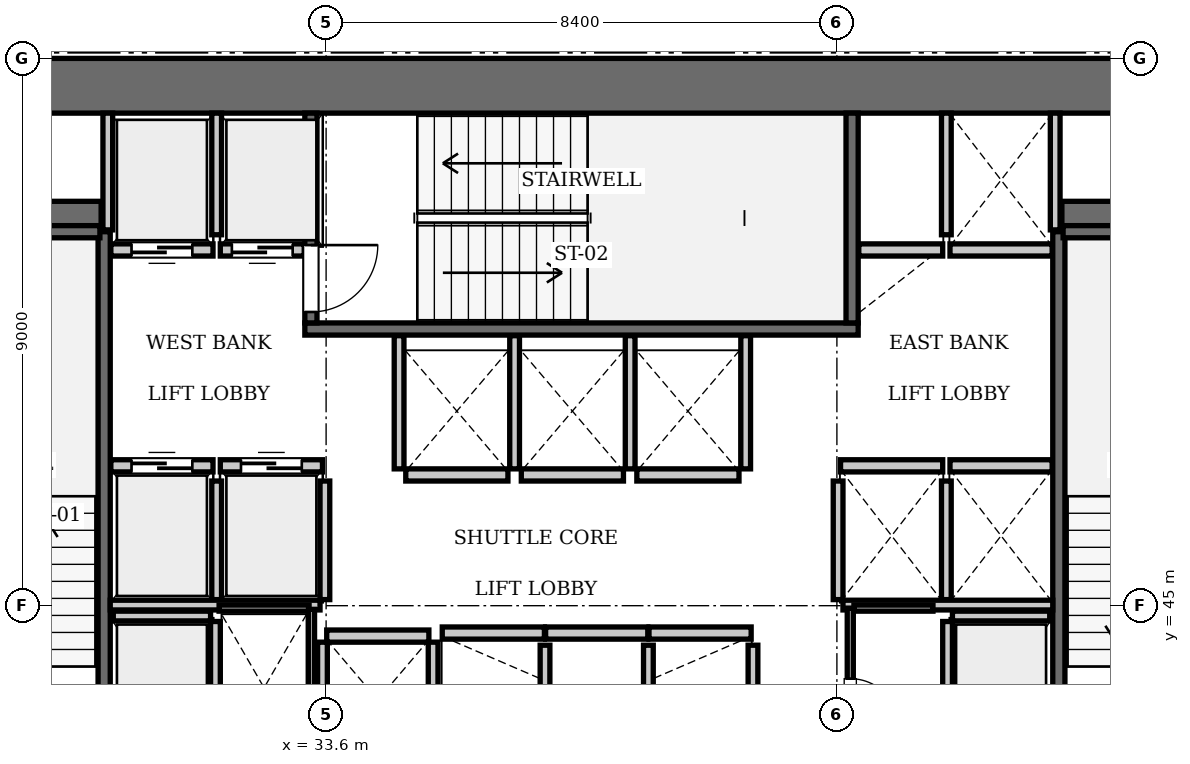
"""IFC4 building model, lengths in metres.
Left out: names, types, materials, properties, quantities, classifications, styles, units other than length and angle.
Written with IfcOpenShell. Run it as: python <this file> out.ifc"""

import sys

from ifc_helpers import new_model, si_unit, direction, frame, frame_2d, origin, place, context, subcontext, project, spatial, rectangle, extrude, element, fill, save


model = new_model("IFC4")
c1 = context("Model", 3, precision=1e-05, world=origin(), true_north=direction((0.0, 1.0)))
c2 = subcontext(c1, "Body", "Model", "MODEL_VIEW")
j1 = project(units=[si_unit("LENGTHUNIT", "METRE"), si_unit("PLANEANGLEUNIT", "RADIAN")], contexts=[c1])
p1 = place(None, origin())
s1 = spatial("IfcSite", under=j1, at=p1, CompositionType="ELEMENT")
p2 = place(p1, origin())
s2 = spatial("IfcBuilding", under=s1, at=p2, CompositionType="ELEMENT")
p3 = place(p2, frame((0.0, 0.0, 57.75)))
s3 = spatial("IfcBuildingStorey", under=s2, at=p3, CompositionType="ELEMENT", Elevation=57.75)
p4 = place(p3, frame((25.2, 53.55, 0.0), z_axis=(0.0, 0.0, 1.0), x_axis=(1.0, 0.0, 0.0)))
e1 = element("IfcWall", 1, at=p4, inside=s3, PredefinedType="SHEAR", context=c2, shape_type="SweptSolid", body=[
    extrude(rectangle(XDim=25.2, YDim=0.9, at=frame_2d((12.6, 0.0))), origin(), (0.0, 0.0, 1.0), 3.85),
])
p5 = place(p3, frame((26.1, 51.4, 0.0), z_axis=(0.0, 0.0, 1.0), x_axis=(1.0, 0.0, 0.0)))
e2 = element("IfcWall", 2, at=p5, inside=s3, PredefinedType="SHEAR", context=c2, shape_type="SweptSolid", body=[
    extrude(rectangle(XDim=3.8, YDim=0.5, at=frame_2d((1.9, 0.0))), origin(), (0.0, 0.0, 1.0), 3.85),
])
p6 = place(p3, frame((45.7, 51.4, 0.0), z_axis=(0.0, 0.0, 1.0), x_axis=(1.0, 0.0, 0.0)))
e3 = element("IfcWall", 3, at=p6, inside=s3, PredefinedType="SHEAR", context=c2, shape_type="SweptSolid", body=[
    extrude(rectangle(XDim=3.8, YDim=0.5, at=frame_2d((1.9, 0.0))), origin(), (0.0, 0.0, 1.0), 3.85),
])
p7 = place(p3, frame((29.95, 42.3, 0.0), z_axis=(0.0, 0.0, 1.0), x_axis=(0.0, 1.0, 0.0)))
e4 = element("IfcWall", 4, at=p7, inside=s3, PredefinedType="SOLIDWALL", context=c2, shape_type="SweptSolid", body=[
    extrude(rectangle(XDim=8.85, YDim=0.2, at=frame_2d((4.425, 0.0))), origin(), (0.0, 0.0, 1.0), 3.61),
])
p8 = place(p3, frame((26.38, 51.15, 0.0), z_axis=(0.0, 0.0, 1.0), x_axis=(1.0, 0.0, 0.0)))
e5 = element("IfcWall", 5, at=p8, inside=s3, PredefinedType="SOLIDWALL", context=c2, shape_type="SweptSolid", body=[
    extrude(rectangle(XDim=3.5, YDim=0.2, at=frame_2d((1.75, 0.0))), origin(), (0.0, 0.0, 1.0), 3.61),
])
p9 = place(p3, frame((33.25, 49.55, 0.0), z_axis=(0.0, 0.0, 1.0), x_axis=(1.0, 0.0, 0.0)))
e6 = element("IfcWall", 6, at=p9, inside=s3, PredefinedType="SOLIDWALL", context=c2, shape_type="SweptSolid", body=[
    extrude(rectangle(XDim=9.1, YDim=0.2, at=frame_2d((4.55, 0.0))), origin(), (0.0, 0.0, 1.0), 3.61),
])
p10 = place(p3, frame((42.25, 49.65, 0.0), z_axis=(0.0, 0.0, 1.0), x_axis=(0.0, 1.0, 0.0)))
e7 = element("IfcWall", 7, at=p10, inside=s3, PredefinedType="SOLIDWALL", context=c2, shape_type="SweptSolid", body=[
    extrude(rectangle(XDim=3.45, YDim=0.2, at=frame_2d((1.725, 0.0))), origin(), (0.0, 0.0, 1.0), 3.61),
])
p11 = place(p3, frame((33.35, 49.65, 0.0), z_axis=(0.0, 0.0, 1.0), x_axis=(0.0, 1.0, 0.0)))
e8 = element("IfcWall", 8, at=p11, inside=s3, PredefinedType="SOLIDWALL", context=c2, shape_type="SweptSolid", body=[
    extrude(rectangle(XDim=3.45, YDim=0.2, at=frame_2d((1.725, 0.0))), origin(), (0.0, 0.0, 1.0), 3.61),
])
p12 = place(p11, frame((0.18, 0.0, 0.0)))
e9 = element("IfcOpeningElement", 9, at=p12, cuts=e8, PredefinedType="OPENING", context=c2, shape_type="SweptSolid", body=[
    extrude(rectangle(XDim=1.1, YDim=2.15, at=frame_2d((0.55, 1.075))), frame((0.0, 0.11, 0.0), z_axis=(0.0, -1.0, 0.0), x_axis=(1.0, 0.0, 0.0)), (0.0, 0.0, 1.0), 0.22),
])
p13 = place(p3, frame((45.65, 42.3, 0.0), z_axis=(0.0, 0.0, 1.0), x_axis=(0.0, 1.0, 0.0)))
e10 = element("IfcWall", 10, at=p13, inside=s3, PredefinedType="SOLIDWALL", context=c2, shape_type="SweptSolid", body=[
    extrude(rectangle(XDim=8.85, YDim=0.2, at=frame_2d((4.425, 0.0))), origin(), (0.0, 0.0, 1.0), 3.61),
])
p14 = place(p3, frame((45.72, 51.15, 0.0), z_axis=(0.0, 0.0, 1.0), x_axis=(1.0, 0.0, 0.0)))
e11 = element("IfcWall", 11, at=p14, inside=s3, PredefinedType="SOLIDWALL", context=c2, shape_type="SweptSolid", body=[
    extrude(rectangle(XDim=3.5, YDim=0.2, at=frame_2d((1.75, 0.0))), origin(), (0.0, 0.0, 1.0), 3.61),
])
p15 = place(p3, frame((30.06, 47.3, 0.0), z_axis=(0.0, 0.0, 1.0), x_axis=(1.0, 0.0, 0.0)))
e12 = element("IfcWall", 12, at=p15, inside=s3, PredefinedType="SOLIDWALL", context=c2, shape_type="SweptSolid", body=[
    extrude(rectangle(XDim=1.68, YDim=0.2, at=frame_2d((0.84, 0.0))), origin(), (0.0, 0.0, 1.0), 3.61),
])
p16 = place(p15, frame((0.34, 0.0, 0.0)))
e13 = element("IfcOpeningElement", 13, at=p16, cuts=e12, PredefinedType="OPENING", context=c2, shape_type="SweptSolid", body=[
    extrude(rectangle(XDim=1.0, YDim=2.15, at=frame_2d((0.5, 1.075))), frame((0.0, 0.11, 0.0), z_axis=(0.0, -1.0, 0.0), x_axis=(1.0, 0.0, 0.0)), (0.0, 0.0, 1.0), 0.22),
])
p17 = place(p3, frame((31.86, 47.3, 0.0), z_axis=(0.0, 0.0, 1.0), x_axis=(1.0, 0.0, 0.0)))
e14 = element("IfcWall", 14, at=p17, inside=s3, PredefinedType="SOLIDWALL", context=c2, shape_type="SweptSolid", body=[
    extrude(rectangle(XDim=1.68, YDim=0.2, at=frame_2d((0.84, 0.0))), origin(), (0.0, 0.0, 1.0), 3.61),
])
p18 = place(p17, frame((0.34, 0.0, 0.0)))
e15 = element("IfcOpeningElement", 15, at=p18, cuts=e14, PredefinedType="OPENING", context=c2, shape_type="SweptSolid", body=[
    extrude(rectangle(XDim=1.0, YDim=2.15, at=frame_2d((0.5, 1.075))), frame((0.0, 0.11, 0.0), z_axis=(0.0, -1.0, 0.0), x_axis=(1.0, 0.0, 0.0)), (0.0, 0.0, 1.0), 0.22),
])
p19 = place(p3, frame((30.06, 50.85, 0.0), z_axis=(0.0, 0.0, 1.0), x_axis=(1.0, 0.0, 0.0)))
e16 = element("IfcWall", 16, at=p19, inside=s3, PredefinedType="SOLIDWALL", context=c2, shape_type="SweptSolid", body=[
    extrude(rectangle(XDim=1.68, YDim=0.2, at=frame_2d((0.84, 0.0))), origin(), (0.0, 0.0, 1.0), 3.61),
])
p20 = place(p19, frame((0.34, 0.0, 0.0)))
e17 = element("IfcOpeningElement", 17, at=p20, cuts=e16, PredefinedType="OPENING", context=c2, shape_type="SweptSolid", body=[
    extrude(rectangle(XDim=1.0, YDim=2.15, at=frame_2d((0.5, 1.075))), frame((0.0, 0.11, 0.0), z_axis=(0.0, -1.0, 0.0), x_axis=(1.0, 0.0, 0.0)), (0.0, 0.0, 1.0), 0.22),
])
p21 = place(p3, frame((31.86, 50.85, 0.0), z_axis=(0.0, 0.0, 1.0), x_axis=(1.0, 0.0, 0.0)))
e18 = element("IfcWall", 18, at=p21, inside=s3, PredefinedType="SOLIDWALL", context=c2, shape_type="SweptSolid", body=[
    extrude(rectangle(XDim=1.38, YDim=0.2, at=frame_2d((0.69, 0.0))), origin(), (0.0, 0.0, 1.0), 3.61),
])
p22 = place(p21, frame((0.19, 0.0, 0.0)))
e19 = element("IfcOpeningElement", 19, at=p22, cuts=e18, PredefinedType="OPENING", context=c2, shape_type="SweptSolid", body=[
    extrude(rectangle(XDim=1.0, YDim=2.15, at=frame_2d((0.5, 1.075))), frame((0.0, 0.11, 0.0), z_axis=(0.0, -1.0, 0.0), x_axis=(1.0, 0.0, 0.0)), (0.0, 0.0, 1.0), 0.22),
])
for number, where, z_axis, x_axis in (
    (20, (42.06, 47.3, 0.0), (0.0, 0.0, 1.0), (1.0, 0.0, 0.0)),
    (21, (43.86, 47.3, 0.0), (0.0, 0.0, 1.0), (1.0, 0.0, 0.0)),
):
    element("IfcWall", number, at=place(p3, frame(where, z_axis=z_axis, x_axis=x_axis)), inside=s3, PredefinedType="SOLIDWALL", context=c2, shape_type="SweptSolid", body=[
        extrude(rectangle(XDim=1.68, YDim=0.2, at=frame_2d((0.84, 0.0))), origin(), (0.0, 0.0, 1.0), 3.61),
    ])
p23 = place(p3, frame((42.36, 50.85, 0.0), z_axis=(0.0, 0.0, 1.0), x_axis=(1.0, 0.0, 0.0)))
e22 = element("IfcWall", 22, at=p23, inside=s3, PredefinedType="SOLIDWALL", context=c2, shape_type="SweptSolid", body=[
    extrude(rectangle(XDim=1.38, YDim=0.2, at=frame_2d((0.69, 0.0))), origin(), (0.0, 0.0, 1.0), 3.61),
])
for number, where, z_axis, x_axis in (
    (23, (43.86, 50.85, 0.0), (0.0, 0.0, 1.0), (1.0, 0.0, 0.0)),
    (24, (35.51, 44.55, 0.0), (0.0, 0.0, 1.0), (1.0, 0.0, 0.0)),
    (25, (37.21, 44.55, 0.0), (0.0, 0.0, 1.0), (1.0, 0.0, 0.0)),
):
    element("IfcWall", number, at=place(p3, frame(where, z_axis=z_axis, x_axis=x_axis)), inside=s3, PredefinedType="SOLIDWALL", context=c2, shape_type="SweptSolid", body=[
        extrude(rectangle(XDim=1.68, YDim=0.2, at=frame_2d((0.84, 0.0))), origin(), (0.0, 0.0, 1.0), 3.61),
    ])
for number, where, z_axis, x_axis in (
    (26, (38.91, 44.55, 0.0), (0.0, 0.0, 1.0), (1.0, 0.0, 0.0)),
    (27, (34.91, 47.15, 0.0), (0.0, 0.0, 1.0), (1.0, 0.0, 0.0)),
):
    element("IfcWall", number, at=place(p3, frame(where, z_axis=z_axis, x_axis=x_axis)), inside=s3, PredefinedType="SOLIDWALL", context=c2, shape_type="SweptSolid", body=[
        extrude(rectangle(XDim=1.68, YDim=0.2, at=frame_2d((0.84, 0.0))), origin(), (0.0, 0.0, 1.0), 3.61),
    ])
for number, where, z_axis, x_axis in (
    (28, (36.81, 47.15, 0.0), (0.0, 0.0, 1.0), (1.0, 0.0, 0.0)),
    (29, (38.71, 47.15, 0.0), (0.0, 0.0, 1.0), (1.0, 0.0, 0.0)),
    (30, (33.61, 44.5, 0.0), (0.0, 0.0, 1.0), (1.0, 0.0, 0.0)),
):
    element("IfcWall", number, at=place(p3, frame(where, z_axis=z_axis, x_axis=x_axis)), inside=s3, PredefinedType="SOLIDWALL", context=c2, shape_type="SweptSolid", body=[
        extrude(rectangle(XDim=1.68, YDim=0.2, at=frame_2d((0.84, 0.0))), origin(), (0.0, 0.0, 1.0), 3.61),
    ])
p24 = place(p3, frame((30.1, 44.83, 0.0), z_axis=(0.0, 0.0, 1.0), x_axis=(1.0, 0.0, 0.0)))
e31 = element("IfcWall", 31, at=p24, inside=s3, PredefinedType="SOLIDWALL", context=c2, shape_type="SweptSolid", body=[
    extrude(rectangle(XDim=1.6, YDim=0.16, at=frame_2d((0.8, 0.0))), origin(), (0.0, 0.0, 1.0), 3.61),
])
p25 = place(p3, frame((31.78, 42.3, 0.0), z_axis=(0.0, 0.0, 1.0), x_axis=(0.0, 1.0, 0.0)))
e32 = element("IfcWall", 32, at=p25, inside=s3, PredefinedType="SOLIDWALL", context=c2, shape_type="SweptSolid", body=[
    extrude(rectangle(XDim=2.44, YDim=0.16, at=frame_2d((1.22, 0.0))), origin(), (0.0, 0.0, 1.0), 3.61),
])
p26 = place(p3, frame((43.9, 44.83, 0.0), z_axis=(0.0, 0.0, 1.0), x_axis=(1.0, 0.0, 0.0)))
e33 = element("IfcWall", 33, at=p26, inside=s3, PredefinedType="SOLIDWALL", context=c2, shape_type="SweptSolid", body=[
    extrude(rectangle(XDim=1.6, YDim=0.16, at=frame_2d((0.8, 0.0))), origin(), (0.0, 0.0, 1.0), 3.61),
])
p27 = place(p3, frame((43.82, 42.3, 0.0), z_axis=(0.0, 0.0, 1.0), x_axis=(0.0, 1.0, 0.0)))
e34 = element("IfcWall", 34, at=p27, inside=s3, PredefinedType="SOLIDWALL", context=c2, shape_type="SweptSolid", body=[
    extrude(rectangle(XDim=2.44, YDim=0.16, at=frame_2d((1.22, 0.0))), origin(), (0.0, 0.0, 1.0), 3.61),
])
for number, where, z_axis, x_axis in (
    (35, (31.8, 45.1, 0.0), (0.0, 0.0, 1.0), (0.0, 1.0, 0.0)),
    (36, (33.58, 45.1, 0.0), (0.0, 0.0, 1.0), (0.0, 1.0, 0.0)),
):
    element("IfcWall", number, at=place(p3, frame(where, z_axis=z_axis, x_axis=x_axis)), inside=s3, PredefinedType="SOLIDWALL", context=c2, shape_type="SweptSolid", body=[
        extrude(rectangle(XDim=1.95, YDim=0.16, at=frame_2d((0.975, 0.0))), origin(), (0.0, 0.0, 1.0), 3.61),
    ])
p28 = place(p3, frame((30.05, 45.01, 0.0), z_axis=(0.0, 0.0, 1.0), x_axis=(1.0, 0.0, 0.0)))
e37 = element("IfcWall", 37, at=p28, inside=s3, PredefinedType="SOLIDWALL", context=c2, shape_type="SweptSolid", body=[
    extrude(rectangle(XDim=3.45, YDim=0.16, at=frame_2d((1.725, 0.0))), origin(), (0.0, 0.0, 1.0), 3.61),
])
p29 = place(p3, frame((30.01, 51.18, 0.0), z_axis=(0.0, 0.0, 1.0), x_axis=(0.0, 1.0, 0.0)))
e38 = element("IfcWall", 38, at=p29, inside=s3, PredefinedType="SOLIDWALL", context=c2, shape_type="SweptSolid", body=[
    extrude(rectangle(XDim=1.92, YDim=0.16, at=frame_2d((0.96, 0.0))), origin(), (0.0, 0.0, 1.0), 3.61),
])
p30 = place(p3, frame((31.8, 51.1, 0.0), z_axis=(0.0, 0.0, 1.0), x_axis=(0.0, 1.0, 0.0)))
e39 = element("IfcWall", 39, at=p30, inside=s3, PredefinedType="SOLIDWALL", context=c2, shape_type="SweptSolid", body=[
    extrude(rectangle(XDim=2.0, YDim=0.16, at=frame_2d((1.0, 0.0))), origin(), (0.0, 0.0, 1.0), 3.61),
])
for number, where, z_axis, x_axis in (
    (40, (42.02, 45.1, 0.0), (0.0, 0.0, 1.0), (0.0, 1.0, 0.0)),
    (41, (43.8, 45.1, 0.0), (0.0, 0.0, 1.0), (0.0, 1.0, 0.0)),
):
    element("IfcWall", number, at=place(p3, frame(where, z_axis=z_axis, x_axis=x_axis)), inside=s3, PredefinedType="SOLIDWALL", context=c2, shape_type="SweptSolid", body=[
        extrude(rectangle(XDim=1.95, YDim=0.16, at=frame_2d((0.975, 0.0))), origin(), (0.0, 0.0, 1.0), 3.61),
    ])
p31 = place(p3, frame((42.1, 45.01, 0.0), z_axis=(0.0, 0.0, 1.0), x_axis=(1.0, 0.0, 0.0)))
e42 = element("IfcWall", 42, at=p31, inside=s3, PredefinedType="SOLIDWALL", context=c2, shape_type="SweptSolid", body=[
    extrude(rectangle(XDim=3.45, YDim=0.16, at=frame_2d((1.725, 0.0))), origin(), (0.0, 0.0, 1.0), 3.61),
])
p32 = place(p3, frame((45.59, 51.18, 0.0), z_axis=(0.0, 0.0, 1.0), x_axis=(0.0, 1.0, 0.0)))
e43 = element("IfcWall", 43, at=p32, inside=s3, PredefinedType="SOLIDWALL", context=c2, shape_type="SweptSolid", body=[
    extrude(rectangle(XDim=1.92, YDim=0.16, at=frame_2d((0.96, 0.0))), origin(), (0.0, 0.0, 1.0), 3.61),
])
p33 = place(p3, frame((43.8, 51.1, 0.0), z_axis=(0.0, 0.0, 1.0), x_axis=(0.0, 1.0, 0.0)))
e44 = element("IfcWall", 44, at=p33, inside=s3, PredefinedType="SOLIDWALL", context=c2, shape_type="SweptSolid", body=[
    extrude(rectangle(XDim=2.0, YDim=0.16, at=frame_2d((1.0, 0.0))), origin(), (0.0, 0.0, 1.0), 3.61),
])
for number, where, z_axis, x_axis in (
    (45, (37.2, 42.3, 0.0), (0.0, 0.0, 1.0), (0.0, 1.0, 0.0)),
    (46, (38.9, 42.3, 0.0), (0.0, 0.0, 1.0), (0.0, 1.0, 0.0)),
    (47, (40.62, 42.3, 0.0), (0.0, 0.0, 1.0), (0.0, 1.0, 0.0)),
):
    element("IfcWall", number, at=place(p3, frame(where, z_axis=z_axis, x_axis=x_axis)), inside=s3, PredefinedType="SOLIDWALL", context=c2, shape_type="SweptSolid", body=[
        extrude(rectangle(XDim=2.05, YDim=0.16, at=frame_2d((1.025, 0.0))), origin(), (0.0, 0.0, 1.0), 3.61),
    ])
for number, where, z_axis, x_axis in (
    (48, (34.8, 47.25, 0.0), (0.0, 0.0, 1.0), (0.0, 1.0, 0.0)),
    (49, (36.7, 47.25, 0.0), (0.0, 0.0, 1.0), (0.0, 1.0, 0.0)),
    (50, (38.6, 47.25, 0.0), (0.0, 0.0, 1.0), (0.0, 1.0, 0.0)),
    (51, (40.5, 47.25, 0.0), (0.0, 0.0, 1.0), (0.0, 1.0, 0.0)),
):
    element("IfcWall", number, at=place(p3, frame(where, z_axis=z_axis, x_axis=x_axis)), inside=s3, PredefinedType="SOLIDWALL", context=c2, shape_type="SweptSolid", body=[
        extrude(rectangle(XDim=2.19, YDim=0.16, at=frame_2d((1.095, 0.0))), origin(), (0.0, 0.0, 1.0), 3.61),
    ])
for number, where, z_axis, x_axis in (
    (52, (33.54, 42.3, 0.0), (0.0, 0.0, 1.0), (0.0, 1.0, 0.0)),
    (53, (35.36, 42.3, 0.0), (0.0, 0.0, 1.0), (0.0, 1.0, 0.0)),
):
    element("IfcWall", number, at=place(p3, frame(where, z_axis=z_axis, x_axis=x_axis)), inside=s3, PredefinedType="SOLIDWALL", context=c2, shape_type="SweptSolid", body=[
        extrude(rectangle(XDim=2.1, YDim=0.16, at=frame_2d((1.05, 0.0))), origin(), (0.0, 0.0, 1.0), 3.61),
    ])
p34 = place(p3, frame((31.84, 44.96, 0.0), z_axis=(0.0, 0.0, 1.0), x_axis=(1.0, 0.0, 0.0)))
e54 = element("IfcWall", 54, at=p34, inside=s3, PredefinedType="PARTITIONING", context=c2, shape_type="SweptSolid", body=[
    extrude(rectangle(XDim=1.48, YDim=0.1, at=frame_2d((0.74, 0.0))), origin(), (0.0, 0.0, 1.0), 3.61),
])
p35 = place(p3, frame((33.36, 42.36, 0.0), z_axis=(0.0, 0.0, 1.0), x_axis=(0.0, 1.0, 0.0)))
e55 = element("IfcWall", 55, at=p35, inside=s3, PredefinedType="PARTITIONING", context=c2, shape_type="SweptSolid", body=[
    extrude(rectangle(XDim=2.58, YDim=0.1, at=frame_2d((1.29, 0.0))), origin(), (0.0, 0.0, 1.0), 3.61),
])
p36 = place(p3, frame((42.22, 42.35, 0.0), z_axis=(0.0, 0.0, 1.0), x_axis=(0.0, 1.0, 0.0)))
e56 = element("IfcWall", 56, at=p36, inside=s3, PredefinedType="PARTITIONING", context=c2, shape_type="SweptSolid", body=[
    extrude(rectangle(XDim=2.61, YDim=0.1, at=frame_2d((1.305, 0.0))), origin(), (0.0, 0.0, 1.0), 3.61),
])
p37 = place(p36, frame((0.65, 0.0, 0.0)))
e57 = element("IfcOpeningElement", 57, at=p37, cuts=e56, PredefinedType="OPENING", context=c2, shape_type="SweptSolid", body=[
    extrude(rectangle(XDim=0.8, YDim=2.05, at=frame_2d((0.4, 1.025))), frame((0.0, 0.06, 0.0), z_axis=(0.0, -1.0, 0.0), x_axis=(1.0, 0.0, 0.0)), (0.0, 0.0, 1.0), 0.12),
])
p38 = place(p3, frame((42.28, 44.96, 0.0), z_axis=(0.0, 0.0, 1.0), x_axis=(1.0, 0.0, 0.0)))
e58 = element("IfcWall", 58, at=p38, inside=s3, PredefinedType="PARTITIONING", context=c2, shape_type="SweptSolid", body=[
    extrude(rectangle(XDim=1.3, YDim=0.1, at=frame_2d((0.65, 0.0))), origin(), (0.0, 0.0, 1.0), 3.61),
])
p39 = place(p12, frame((1.1, 0.0, 0.0), z_axis=(0.0, 0.0, 1.0), x_axis=(-1.0, 0.0, 0.0)))
e59 = element("IfcDoor", 59, at=p39, inside=s3, OperationType="SINGLE_SWING_LEFT", PredefinedType="DOOR", context=c2, shape_type="SweptSolid", body=[
    extrude(rectangle(XDim=1.1, YDim=2.15, at=frame_2d((0.55, 1.075))), frame((0.0, 0.025, 0.0), z_axis=(0.0, -1.0, 0.0), x_axis=(1.0, 0.0, 0.0)), (0.0, 0.0, 1.0), 0.05),
])
fill(e9, e59)
p40 = place(p16, origin())
e60 = element("IfcDoor", 60, at=p40, inside=s3, OperationType="SLIDING_TO_LEFT", PredefinedType="DOOR", context=c2, shape_type="SweptSolid", body=[
    extrude(rectangle(XDim=1.0, YDim=2.15, at=frame_2d((0.5, 1.075))), frame((0.0, 0.025, 0.0), z_axis=(0.0, -1.0, 0.0), x_axis=(1.0, 0.0, 0.0)), (0.0, 0.0, 1.0), 0.05),
])
fill(e13, e60)
p41 = place(p18, origin())
e61 = element("IfcDoor", 61, at=p41, inside=s3, OperationType="SLIDING_TO_LEFT", PredefinedType="DOOR", context=c2, shape_type="SweptSolid", body=[
    extrude(rectangle(XDim=1.0, YDim=2.15, at=frame_2d((0.5, 1.075))), frame((0.0, 0.025, 0.0), z_axis=(0.0, -1.0, 0.0), x_axis=(1.0, 0.0, 0.0)), (0.0, 0.0, 1.0), 0.05),
])
fill(e15, e61)
p42 = place(p20, frame((1.0, 0.0, 0.0), z_axis=(0.0, 0.0, 1.0), x_axis=(-1.0, 0.0, 0.0)))
e62 = element("IfcDoor", 62, at=p42, inside=s3, OperationType="SLIDING_TO_LEFT", PredefinedType="DOOR", context=c2, shape_type="SweptSolid", body=[
    extrude(rectangle(XDim=1.0, YDim=2.15, at=frame_2d((0.5, 1.075))), frame((0.0, 0.025, 0.0), z_axis=(0.0, -1.0, 0.0), x_axis=(1.0, 0.0, 0.0)), (0.0, 0.0, 1.0), 0.05),
])
fill(e17, e62)
p43 = place(p22, frame((1.0, 0.0, 0.0), z_axis=(0.0, 0.0, 1.0), x_axis=(-1.0, 0.0, 0.0)))
e63 = element("IfcDoor", 63, at=p43, inside=s3, OperationType="SLIDING_TO_LEFT", PredefinedType="DOOR", context=c2, shape_type="SweptSolid", body=[
    extrude(rectangle(XDim=1.0, YDim=2.15, at=frame_2d((0.5, 1.075))), frame((0.0, 0.025, 0.0), z_axis=(0.0, -1.0, 0.0), x_axis=(1.0, 0.0, 0.0)), (0.0, 0.0, 1.0), 0.05),
])
fill(e19, e63)
p44 = place(p37, frame((0.8, 0.0, 0.0), z_axis=(0.0, 0.0, 1.0), x_axis=(-1.0, 0.0, 0.0)))
e64 = element("IfcDoor", 64, at=p44, inside=s3, OperationType="SINGLE_SWING_RIGHT", PredefinedType="DOOR", context=c2, shape_type="SweptSolid", body=[
    extrude(rectangle(XDim=0.8, YDim=2.05, at=frame_2d((0.4, 1.025))), frame((0.0, 0.025, 0.0), z_axis=(0.0, -1.0, 0.0), x_axis=(1.0, 0.0, 0.0)), (0.0, 0.0, 1.0), 0.05),
])
fill(e57, e64)
save(model, sys.argv[1])
